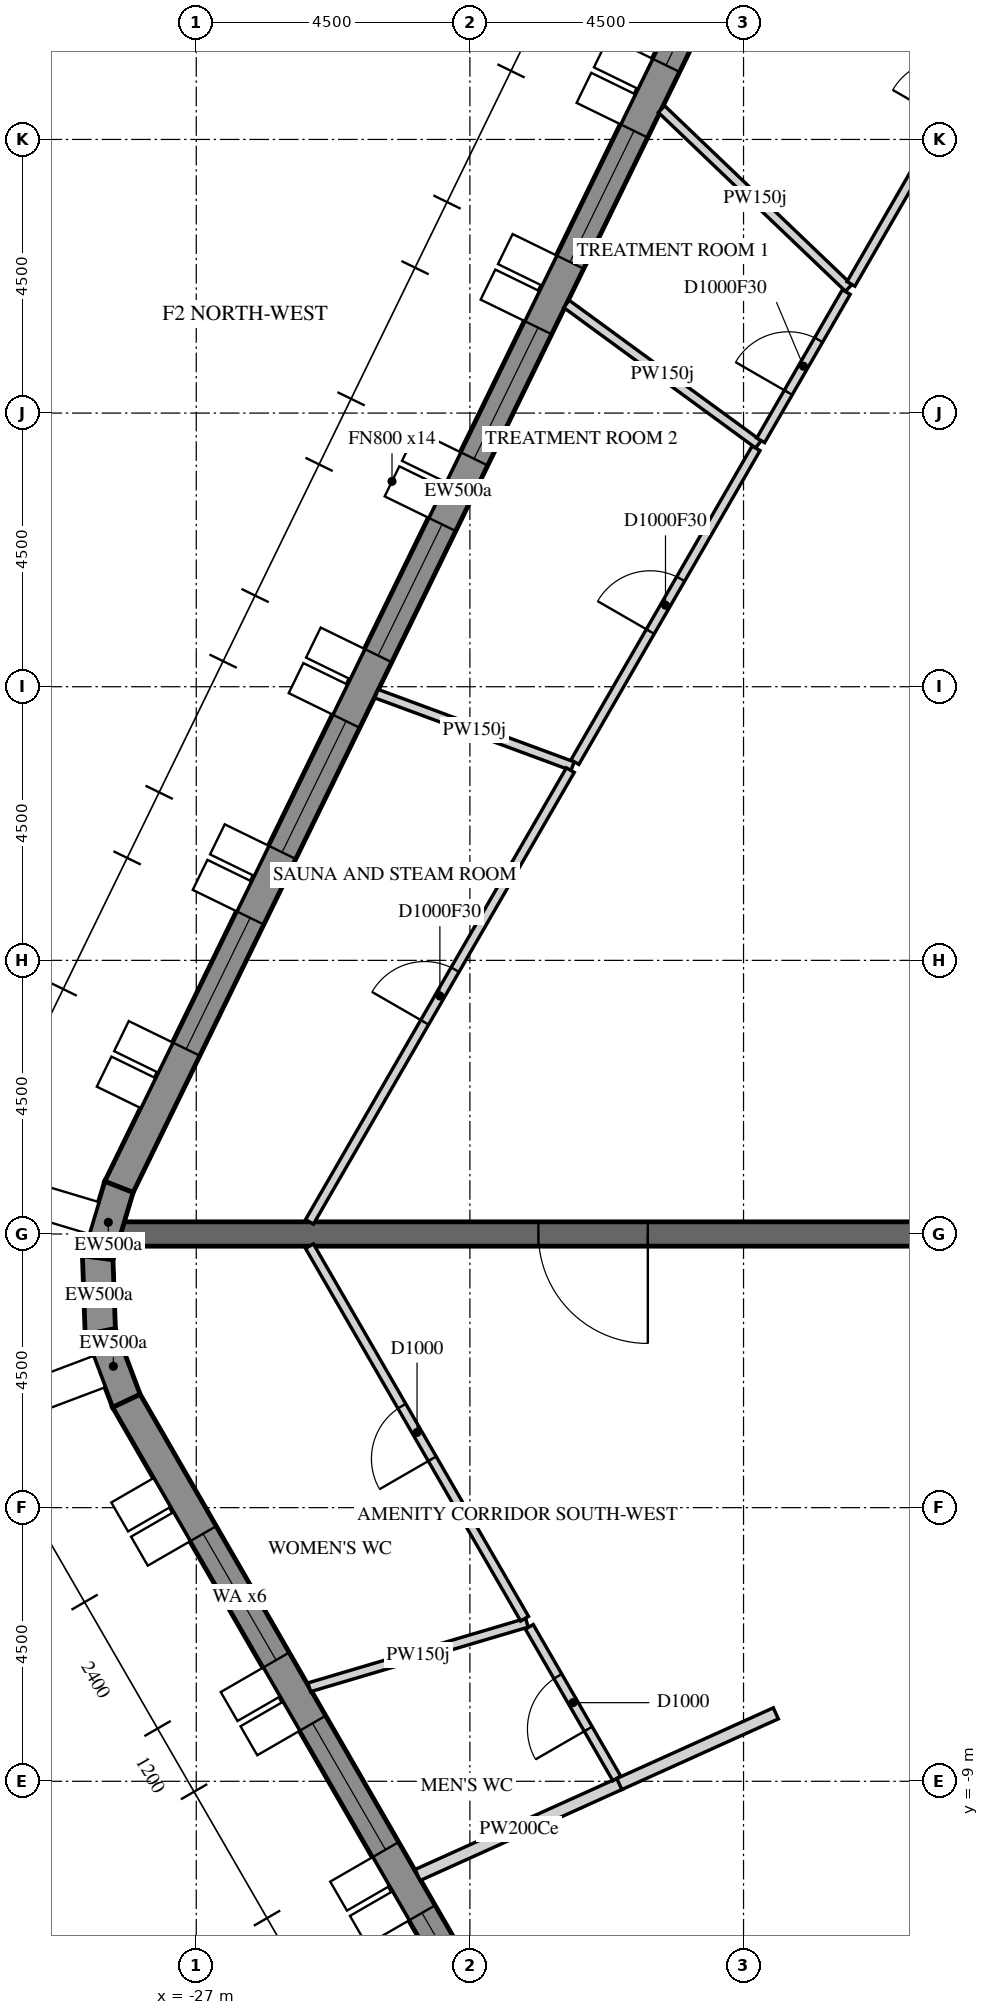
"""IFC4 building model, lengths in metres.
Left out: names, types, materials, properties, quantities, classifications, styles, units other than length and angle.
Written with IfcOpenShell. Run it as: python <this file> out.ifc"""

import sys

from ifc_helpers import new_model, si_unit, direction, frame, frame_2d, origin, place, context, subcontext, project, spatial, polyline, rectangle, outline, extrude, element, fill, save


model = new_model("IFC4")
c1 = context("Model", 3, precision=1e-05, world=origin(), true_north=direction((0.0, 1.0)))
c2 = subcontext(c1, "Body", "Model", "MODEL_VIEW")
j1 = project(units=[si_unit("LENGTHUNIT", "METRE"), si_unit("PLANEANGLEUNIT", "RADIAN")], contexts=[c1])
p1 = place(None, origin())
s1 = spatial("IfcSite", under=j1, at=p1, CompositionType="ELEMENT")
p2 = place(p1, origin())
s2 = spatial("IfcBuilding", under=s1, at=p2, CompositionType="ELEMENT")
p3 = place(p2, frame((0.0, 0.0, 338.1)))
s3 = spatial("IfcBuildingStorey", under=s2, at=p3, CompositionType="ELEMENT", Elevation=338.1)
p4 = place(p3, frame((-17.118, 23.644, -0.3), z_axis=(0.0, 0.0, 1.0), x_axis=(-0.438368241894, -0.898795463106, 0.0)))
e1 = element("IfcWall", 1, at=p4, inside=s3, PredefinedType="SOLIDWALL", context=c2, shape_type="SweptSolid", body=[
    extrude(outline(polyline([(-0.023, -0.25), (25.465, -0.25), (25.424, 0.25), (0.023, 0.25), (-0.023, -0.25)])), origin(), (0.0, 0.0, 1.0), 5.4),
])
p5 = place(p4, frame((2.522, 0.0, 1.2)))
e2 = element("IfcOpeningElement", 2, at=p5, cuts=e1, PredefinedType="OPENING", context=c2, shape_type="SweptSolid", body=[
    extrude(rectangle(XDim=2.4, YDim=3.6, at=frame_2d((1.2, 1.8))), frame((0.0, 0.26, 0.0), z_axis=(0.0, -1.0, 0.0), x_axis=(1.0, 0.0, 0.0)), (0.0, 0.0, 1.0), 0.52),
])
p6 = place(p4, frame((6.122, 0.0, 1.2)))
e3 = element("IfcOpeningElement", 3, at=p6, cuts=e1, PredefinedType="OPENING", context=c2, shape_type="SweptSolid", body=[
    extrude(rectangle(XDim=2.4, YDim=3.6, at=frame_2d((1.2, 1.8))), frame((0.0, 0.26, 0.0), z_axis=(0.0, -1.0, 0.0), x_axis=(1.0, 0.0, 0.0)), (0.0, 0.0, 1.0), 0.52),
])
p7 = place(p4, frame((9.722, 0.0, 1.2)))
e4 = element("IfcOpeningElement", 4, at=p7, cuts=e1, PredefinedType="OPENING", context=c2, shape_type="SweptSolid", body=[
    extrude(rectangle(XDim=2.4, YDim=3.6, at=frame_2d((1.2, 1.8))), frame((0.0, 0.26, 0.0), z_axis=(0.0, -1.0, 0.0), x_axis=(1.0, 0.0, 0.0)), (0.0, 0.0, 1.0), 0.52),
])
p8 = place(p4, frame((13.323, 0.0, 1.2)))
e5 = element("IfcOpeningElement", 5, at=p8, cuts=e1, PredefinedType="OPENING", context=c2, shape_type="SweptSolid", body=[
    extrude(rectangle(XDim=2.4, YDim=3.6, at=frame_2d((1.2, 1.8))), frame((0.0, 0.26, 0.0), z_axis=(0.0, -1.0, 0.0), x_axis=(1.0, 0.0, 0.0)), (0.0, 0.0, 1.0), 0.52),
])
p9 = place(p4, frame((16.922, 0.0, 1.2)))
e6 = element("IfcOpeningElement", 6, at=p9, cuts=e1, PredefinedType="OPENING", context=c2, shape_type="SweptSolid", body=[
    extrude(rectangle(XDim=2.4, YDim=3.6, at=frame_2d((1.2, 1.8))), frame((0.0, 0.26, 0.0), z_axis=(0.0, -1.0, 0.0), x_axis=(1.0, 0.0, 0.0)), (0.0, 0.0, 1.0), 0.52),
])
p10 = place(p4, frame((20.522, 0.0, 1.2)))
e7 = element("IfcOpeningElement", 7, at=p10, cuts=e1, PredefinedType="OPENING", context=c2, shape_type="SweptSolid", body=[
    extrude(rectangle(XDim=2.4, YDim=3.6, at=frame_2d((1.2, 1.8))), frame((0.0, 0.26, 0.0), z_axis=(0.0, -1.0, 0.0), x_axis=(1.0, 0.0, 0.0)), (0.0, 0.0, 1.0), 0.52),
])
p11 = place(p3, frame((-28.272, 0.774, -0.3), z_axis=(0.0, 0.0, 1.0), x_axis=(-0.286813843218, -0.957986335674, 0.0)))
e8 = element("IfcWall", 8, at=p11, inside=s3, PredefinedType="SOLIDWALL", context=c2, shape_type="SweptSolid", body=[
    extrude(outline(polyline([(-0.021, -0.25), (1.257, -0.25), (1.175, 0.25), (0.021, 0.25), (-0.021, -0.25)])), origin(), (0.0, 0.0, 1.0), 5.4),
])
p12 = place(p3, frame((-28.621, -0.391, -0.3), z_axis=(0.0, 0.0, 1.0), x_axis=(0.034925456137, -0.999389920158, 0.0)))
e9 = element("IfcWall", 9, at=p12, inside=s3, PredefinedType="SOLIDWALL", context=c2, shape_type="SweptSolid", body=[
    extrude(outline(polyline([(-0.041, -0.25), (1.257, -0.25), (1.175, 0.25), (0.041, 0.25), (-0.041, -0.25)])), origin(), (0.0, 0.0, 1.0), 5.4),
])
p13 = place(p3, frame((-28.578, -1.606, -0.3), z_axis=(0.0, 0.0, 1.0), x_axis=(0.352838463023, -0.935684251771, 0.0)))
e10 = element("IfcWall", 10, at=p13, inside=s3, PredefinedType="SOLIDWALL", context=c2, shape_type="SweptSolid", body=[
    extrude(outline(polyline([(-0.041, -0.25), (1.237, -0.25), (1.196, 0.25), (0.041, 0.25), (-0.041, -0.25)])), origin(), (0.0, 0.0, 1.0), 5.4),
])
p14 = place(p3, frame((-28.149, -2.745, -0.3), z_axis=(0.0, 0.0, 1.0), x_axis=(0.500003737743, -0.866023245787, 0.0)))
e11 = element("IfcWall", 11, at=p14, inside=s3, PredefinedType="SOLIDWALL", context=c2, shape_type="SweptSolid", body=[
    extrude(outline(polyline([(-0.021, -0.25), (25.468, -0.25), (25.421, 0.25), (0.021, 0.25), (-0.021, -0.25)])), origin(), (0.0, 0.0, 1.0), 5.4),
])
p15 = place(p14, frame((2.522, 0.0, 1.2)))
e12 = element("IfcOpeningElement", 12, at=p15, cuts=e11, PredefinedType="OPENING", context=c2, shape_type="SweptSolid", body=[
    extrude(rectangle(XDim=2.4, YDim=3.6, at=frame_2d((1.2, 1.8))), frame((0.0, 0.26, 0.0), z_axis=(0.0, -1.0, 0.0), x_axis=(1.0, 0.0, 0.0)), (0.0, 0.0, 1.0), 0.52),
])
p16 = place(p14, frame((6.122, 0.0, 1.2)))
e13 = element("IfcOpeningElement", 13, at=p16, cuts=e11, PredefinedType="OPENING", context=c2, shape_type="SweptSolid", body=[
    extrude(rectangle(XDim=2.4, YDim=3.6, at=frame_2d((1.2, 1.8))), frame((0.0, 0.26, 0.0), z_axis=(0.0, -1.0, 0.0), x_axis=(1.0, 0.0, 0.0)), (0.0, 0.0, 1.0), 0.52),
])
p17 = place(p14, frame((9.722, 0.0, 1.2)))
e14 = element("IfcOpeningElement", 14, at=p17, cuts=e11, PredefinedType="OPENING", context=c2, shape_type="SweptSolid", body=[
    extrude(rectangle(XDim=2.4, YDim=3.6, at=frame_2d((1.2, 1.8))), frame((0.0, 0.26, 0.0), z_axis=(0.0, -1.0, 0.0), x_axis=(1.0, 0.0, 0.0)), (0.0, 0.0, 1.0), 0.52),
])
p18 = place(p14, frame((13.323, 0.0, 1.2)))
e15 = element("IfcOpeningElement", 15, at=p18, cuts=e11, PredefinedType="OPENING", context=c2, shape_type="SweptSolid", body=[
    extrude(rectangle(XDim=2.4, YDim=3.6, at=frame_2d((1.2, 1.8))), frame((0.0, 0.26, 0.0), z_axis=(0.0, -1.0, 0.0), x_axis=(1.0, 0.0, 0.0)), (0.0, 0.0, 1.0), 0.52),
])
p19 = place(p14, frame((16.922, 0.0, 1.2)))
e16 = element("IfcOpeningElement", 16, at=p19, cuts=e11, PredefinedType="OPENING", context=c2, shape_type="SweptSolid", body=[
    extrude(rectangle(XDim=2.4, YDim=3.6, at=frame_2d((1.2, 1.8))), frame((0.0, 0.26, 0.0), z_axis=(0.0, -1.0, 0.0), x_axis=(1.0, 0.0, 0.0)), (0.0, 0.0, 1.0), 0.52),
])
p20 = place(p14, frame((20.522, 0.0, 1.2)))
e17 = element("IfcOpeningElement", 17, at=p20, cuts=e11, PredefinedType="OPENING", context=c2, shape_type="SweptSolid", body=[
    extrude(rectangle(XDim=2.4, YDim=3.6, at=frame_2d((1.2, 1.8))), frame((0.0, 0.26, 0.0), z_axis=(0.0, -1.0, 0.0), x_axis=(1.0, 0.0, 0.0)), (0.0, 0.0, 1.0), 0.52),
])
p21 = place(p3, frame((-12.702, 0.0, -0.3), z_axis=(0.0, 0.0, 1.0), x_axis=(-1.0, 0.0, 0.0)))
e18 = element("IfcWall", 18, at=p21, inside=s3, PredefinedType="SHEAR", context=c2, shape_type="SweptSolid", body=[
    extrude(rectangle(XDim=15.544, YDim=0.4, at=frame_2d((7.772, 0.0))), origin(), (0.0, 0.0, 1.0), 5.4),
])
p22 = place(p21, frame((6.872, 0.0, 0.3)))
e19 = element("IfcOpeningElement", 19, at=p22, cuts=e18, PredefinedType="OPENING", context=c2, shape_type="SweptSolid", body=[
    extrude(rectangle(XDim=1.8, YDim=2.4, at=frame_2d((0.9, 1.2))), frame((0.0, 0.21, 0.0), z_axis=(0.0, -1.0, 0.0), x_axis=(1.0, 0.0, 0.0)), (0.0, 0.0, 1.0), 0.42),
])
p23 = place(p3, frame((-25.141, -7.454, 0.0), z_axis=(0.0, 0.0, 1.0), x_axis=(0.958757197132, 0.28422638327, 0.0)))
e20 = element("IfcWall", 20, at=p23, inside=s3, PredefinedType="PARTITIONING", context=c2, shape_type="SweptSolid", body=[
    extrude(rectangle(XDim=3.733, YDim=0.15, at=frame_2d((1.867, 0.0))), origin(), (0.0, 0.0, 1.0), 4.346),
])
p24 = place(p3, frame((-21.601, -6.326, 0.0), z_axis=(0.0, 0.0, 1.0), x_axis=(-0.500040111433, 0.866002244199, 0.0)))
e21 = element("IfcWall", 21, at=p24, inside=s3, PredefinedType="PARTITIONING", context=c2, shape_type="SweptSolid", body=[
    extrude(rectangle(XDim=7.074, YDim=0.15, at=frame_2d((3.537, 0.0))), origin(), (0.0, 0.0, 1.0), 5.1),
])
p25 = place(p24, frame((3.037, 0.0, 0.0)))
e22 = element("IfcOpeningElement", 22, at=p25, cuts=e21, PredefinedType="OPENING", context=c2, shape_type="SweptSolid", body=[
    extrude(rectangle(XDim=1.0, YDim=2.1, at=frame_2d((0.5, 1.05))), frame((0.0, 0.085, 0.0), z_axis=(0.0, -1.0, 0.0), x_axis=(1.0, 0.0, 0.0)), (0.0, 0.0, 1.0), 0.17),
])
p26 = place(p3, frame((-24.037, 8.886, 0.0), z_axis=(0.0, 0.0, 1.0), x_axis=(0.938027612167, -0.346560526911, 0.0)))
e23 = element("IfcWall", 23, at=p26, inside=s3, PredefinedType="PARTITIONING", context=c2, shape_type="SweptSolid", body=[
    extrude(rectangle(XDim=3.439, YDim=0.15, at=frame_2d((1.72, 0.0))), origin(), (0.0, 0.0, 1.0), 4.346),
])
p27 = place(p3, frame((-23.359, -10.541, 0.0), z_axis=(0.0, 0.0, 1.0), x_axis=(0.91155143735, 0.41118606137, 0.0)))
e24 = element("IfcWall", 24, at=p27, inside=s3, PredefinedType="PARTITIONING", context=c2, shape_type="SweptSolid", body=[
    extrude(rectangle(XDim=3.657, YDim=0.2, at=frame_2d((1.829, 0.0))), origin(), (0.0, 0.0, 1.0), 4.346),
])
p28 = place(p3, frame((-20.084, -8.954, 0.0), z_axis=(0.0, 0.0, 1.0), x_axis=(-0.499795848753, 0.866143238483, 0.0)))
e25 = element("IfcWall", 25, at=p28, inside=s3, PredefinedType="PARTITIONING", context=c2, shape_type="SweptSolid", body=[
    extrude(rectangle(XDim=2.88, YDim=0.15, at=frame_2d((1.44, 0.0))), origin(), (0.0, 0.0, 1.0), 5.1),
])
p29 = place(p28, frame((0.94, 0.0, 0.0)))
e26 = element("IfcOpeningElement", 26, at=p29, cuts=e25, PredefinedType="OPENING", context=c2, shape_type="SweptSolid", body=[
    extrude(rectangle(XDim=1.0, YDim=2.1, at=frame_2d((0.5, 1.05))), frame((0.0, 0.085, 0.0), z_axis=(0.0, -1.0, 0.0), x_axis=(1.0, 0.0, 0.0)), (0.0, 0.0, 1.0), 0.17),
])
p30 = place(p3, frame((-20.912, 15.295, 0.0), z_axis=(0.0, 0.0, 1.0), x_axis=(0.807083298113, -0.590437591882, 0.0)))
e27 = element("IfcWall", 27, at=p30, inside=s3, PredefinedType="PARTITIONING", context=c2, shape_type="SweptSolid", body=[
    extrude(rectangle(XDim=3.91, YDim=0.15, at=frame_2d((1.955, 0.0))), origin(), (0.0, 0.0, 1.0), 4.346),
])
p31 = place(p3, frame((-25.138, 0.2, 0.0), z_axis=(0.0, 0.0, 1.0), x_axis=(0.500011542666, 0.866018739521, 0.0)))
e28 = element("IfcWall", 28, at=p31, inside=s3, PredefinedType="PARTITIONING", context=c2, shape_type="SweptSolid", body=[
    extrude(rectangle(XDim=8.577, YDim=0.15, at=frame_2d((4.289, 0.0))), origin(), (0.0, 0.0, 1.0), 5.1),
])
p32 = place(p31, frame((3.789, 0.0, 0.0)))
e29 = element("IfcOpeningElement", 29, at=p32, cuts=e28, PredefinedType="OPENING", context=c2, shape_type="SweptSolid", body=[
    extrude(rectangle(XDim=1.0, YDim=2.1, at=frame_2d((0.5, 1.05))), frame((0.0, 0.085, 0.0), z_axis=(0.0, -1.0, 0.0), x_axis=(1.0, 0.0, 0.0)), (0.0, 0.0, 1.0), 0.17),
])
p33 = place(p3, frame((-20.043, -9.045, 0.0), z_axis=(0.0, 0.0, 1.0), x_axis=(0.911446947279, 0.411417625164, 0.0)))
e30 = element("IfcWall", 30, at=p33, inside=s3, PredefinedType="PARTITIONING", context=c2, shape_type="SweptSolid", body=[
    extrude(rectangle(XDim=2.824, YDim=0.2, at=frame_2d((1.412, 0.0))), origin(), (0.0, 0.0, 1.0), 4.346),
])
p34 = place(p3, frame((-19.349, 18.499, 0.0), z_axis=(0.0, 0.0, 1.0), x_axis=(0.722785064333, -0.691072898309, 0.0)))
e31 = element("IfcWall", 31, at=p34, inside=s3, PredefinedType="PARTITIONING", context=c2, shape_type="SweptSolid", body=[
    extrude(rectangle(XDim=4.257, YDim=0.15, at=frame_2d((2.129, 0.0))), origin(), (0.0, 0.0, 1.0), 4.346),
])
p35 = place(p3, frame((-20.773, 7.76, 0.0), z_axis=(0.0, 0.0, 1.0), x_axis=(0.49996834992, 0.866043676195, 0.0)))
e32 = element("IfcWall", 32, at=p35, inside=s3, PredefinedType="PARTITIONING", context=c2, shape_type="SweptSolid", body=[
    extrude(rectangle(XDim=5.959, YDim=0.15, at=frame_2d((2.979, 0.0))), origin(), (0.0, 0.0, 1.0), 5.1),
])
p36 = place(p35, frame((2.479, 0.0, 0.0)))
e33 = element("IfcOpeningElement", 33, at=p36, cuts=e32, PredefinedType="OPENING", context=c2, shape_type="SweptSolid", body=[
    extrude(rectangle(XDim=1.0, YDim=2.1, at=frame_2d((0.5, 1.05))), frame((0.0, 0.085, 0.0), z_axis=(0.0, -1.0, 0.0), x_axis=(1.0, 0.0, 0.0)), (0.0, 0.0, 1.0), 0.17),
])
p37 = place(p3, frame((-17.718, 13.051, 0.0), z_axis=(0.0, 0.0, 1.0), x_axis=(0.4998875608, 0.866090310855, 0.0)))
e34 = element("IfcWall", 34, at=p37, inside=s3, PredefinedType="PARTITIONING", context=c2, shape_type="SweptSolid", body=[
    extrude(rectangle(XDim=2.816, YDim=0.15, at=frame_2d((1.408, 0.0))), origin(), (0.0, 0.0, 1.0), 5.1),
])
p38 = place(p37, frame((0.908, 0.0, 0.0)))
e35 = element("IfcOpeningElement", 35, at=p38, cuts=e34, PredefinedType="OPENING", context=c2, shape_type="SweptSolid", body=[
    extrude(rectangle(XDim=1.0, YDim=2.1, at=frame_2d((0.5, 1.05))), frame((0.0, 0.085, 0.0), z_axis=(0.0, -1.0, 0.0), x_axis=(1.0, 0.0, 0.0)), (0.0, 0.0, 1.0), 0.17),
])
p39 = place(p3, frame((-16.233, 15.624, 0.0), z_axis=(0.0, 0.0, 1.0), x_axis=(0.500012524703, 0.866018172523, 0.0)))
e36 = element("IfcWall", 36, at=p39, inside=s3, PredefinedType="PARTITIONING", context=c2, shape_type="SweptSolid", body=[
    extrude(rectangle(XDim=7.213, YDim=0.15, at=frame_2d((3.606, 0.0))), origin(), (0.0, 0.0, 1.0), 5.1),
])
p40 = place(p39, frame((3.106, 0.0, 0.0)))
e37 = element("IfcOpeningElement", 37, at=p40, cuts=e36, PredefinedType="OPENING", context=c2, shape_type="SweptSolid", body=[
    extrude(rectangle(XDim=1.0, YDim=2.1, at=frame_2d((0.5, 1.05))), frame((0.0, 0.085, 0.0), z_axis=(0.0, -1.0, 0.0), x_axis=(1.0, 0.0, 0.0)), (0.0, 0.0, 1.0), 0.17),
])
p41 = place(p5, frame((0.0, 0.18, 0.0)))
e38 = element("IfcWindow", 38, at=p41, inside=s3, PartitioningType="DOUBLE_PANEL_VERTICAL", PredefinedType="WINDOW", context=c2, shape_type="SweptSolid", body=[
    extrude(rectangle(XDim=2.4, YDim=3.6, at=frame_2d((1.2, 1.8))), frame((0.0, 0.03, 0.0), z_axis=(0.0, -1.0, 0.0), x_axis=(1.0, 0.0, 0.0)), (0.0, 0.0, 1.0), 0.06),
])
fill(e2, e38)
p42 = place(p6, frame((0.0, 0.18, 0.0)))
e39 = element("IfcWindow", 39, at=p42, inside=s3, PartitioningType="DOUBLE_PANEL_VERTICAL", PredefinedType="WINDOW", context=c2, shape_type="SweptSolid", body=[
    extrude(rectangle(XDim=2.4, YDim=3.6, at=frame_2d((1.2, 1.8))), frame((0.0, 0.03, 0.0), z_axis=(0.0, -1.0, 0.0), x_axis=(1.0, 0.0, 0.0)), (0.0, 0.0, 1.0), 0.06),
])
fill(e3, e39)
p43 = place(p7, frame((0.0, 0.18, 0.0)))
e40 = element("IfcWindow", 40, at=p43, inside=s3, PartitioningType="DOUBLE_PANEL_VERTICAL", PredefinedType="WINDOW", context=c2, shape_type="SweptSolid", body=[
    extrude(rectangle(XDim=2.4, YDim=3.6, at=frame_2d((1.2, 1.8))), frame((0.0, 0.03, 0.0), z_axis=(0.0, -1.0, 0.0), x_axis=(1.0, 0.0, 0.0)), (0.0, 0.0, 1.0), 0.06),
])
fill(e4, e40)
p44 = place(p8, frame((0.0, 0.18, 0.0)))
e41 = element("IfcWindow", 41, at=p44, inside=s3, PartitioningType="DOUBLE_PANEL_VERTICAL", PredefinedType="WINDOW", context=c2, shape_type="SweptSolid", body=[
    extrude(rectangle(XDim=2.4, YDim=3.6, at=frame_2d((1.2, 1.8))), frame((0.0, 0.03, 0.0), z_axis=(0.0, -1.0, 0.0), x_axis=(1.0, 0.0, 0.0)), (0.0, 0.0, 1.0), 0.06),
])
fill(e5, e41)
p45 = place(p9, frame((0.0, 0.18, 0.0)))
e42 = element("IfcWindow", 42, at=p45, inside=s3, PartitioningType="DOUBLE_PANEL_VERTICAL", PredefinedType="WINDOW", context=c2, shape_type="SweptSolid", body=[
    extrude(rectangle(XDim=2.4, YDim=3.6, at=frame_2d((1.2, 1.8))), frame((0.0, 0.03, 0.0), z_axis=(0.0, -1.0, 0.0), x_axis=(1.0, 0.0, 0.0)), (0.0, 0.0, 1.0), 0.06),
])
fill(e6, e42)
p46 = place(p10, frame((0.0, 0.18, 0.0)))
e43 = element("IfcWindow", 43, at=p46, inside=s3, PartitioningType="DOUBLE_PANEL_VERTICAL", PredefinedType="WINDOW", context=c2, shape_type="SweptSolid", body=[
    extrude(rectangle(XDim=2.4, YDim=3.6, at=frame_2d((1.2, 1.8))), frame((0.0, 0.03, 0.0), z_axis=(0.0, -1.0, 0.0), x_axis=(1.0, 0.0, 0.0)), (0.0, 0.0, 1.0), 0.06),
])
fill(e7, e43)
p47 = place(p15, frame((0.0, 0.18, 0.0)))
e44 = element("IfcWindow", 44, at=p47, inside=s3, PartitioningType="DOUBLE_PANEL_VERTICAL", PredefinedType="WINDOW", context=c2, shape_type="SweptSolid", body=[
    extrude(rectangle(XDim=2.4, YDim=3.6, at=frame_2d((1.2, 1.8))), frame((0.0, 0.03, 0.0), z_axis=(0.0, -1.0, 0.0), x_axis=(1.0, 0.0, 0.0)), (0.0, 0.0, 1.0), 0.06),
])
fill(e12, e44)
p48 = place(p16, frame((0.0, 0.18, 0.0)))
e45 = element("IfcWindow", 45, at=p48, inside=s3, PartitioningType="DOUBLE_PANEL_VERTICAL", PredefinedType="WINDOW", context=c2, shape_type="SweptSolid", body=[
    extrude(rectangle(XDim=2.4, YDim=3.6, at=frame_2d((1.2, 1.8))), frame((0.0, 0.03, 0.0), z_axis=(0.0, -1.0, 0.0), x_axis=(1.0, 0.0, 0.0)), (0.0, 0.0, 1.0), 0.06),
])
fill(e13, e45)
p49 = place(p17, frame((0.0, 0.18, 0.0)))
e46 = element("IfcWindow", 46, at=p49, inside=s3, PartitioningType="DOUBLE_PANEL_VERTICAL", PredefinedType="WINDOW", context=c2, shape_type="SweptSolid", body=[
    extrude(rectangle(XDim=2.4, YDim=3.6, at=frame_2d((1.2, 1.8))), frame((0.0, 0.03, 0.0), z_axis=(0.0, -1.0, 0.0), x_axis=(1.0, 0.0, 0.0)), (0.0, 0.0, 1.0), 0.06),
])
fill(e14, e46)
p50 = place(p22, origin())
e47 = element("IfcDoor", 47, at=p50, inside=s3, OperationType="DOUBLE_DOOR_SINGLE_SWING", PredefinedType="DOOR", context=c2, shape_type="SweptSolid", body=[
    extrude(rectangle(XDim=1.8, YDim=2.4, at=frame_2d((0.9, 1.2))), frame((0.0, 0.025, 0.0), z_axis=(0.0, -1.0, 0.0), x_axis=(1.0, 0.0, 0.0)), (0.0, 0.0, 1.0), 0.05),
])
fill(e19, e47)
p51 = place(p25, origin())
e48 = element("IfcDoor", 48, at=p51, inside=s3, OperationType="SINGLE_SWING_RIGHT", PredefinedType="DOOR", context=c2, shape_type="SweptSolid", body=[
    extrude(rectangle(XDim=1.0, YDim=2.1, at=frame_2d((0.5, 1.05))), frame((0.0, 0.025, 0.0), z_axis=(0.0, -1.0, 0.0), x_axis=(1.0, 0.0, 0.0)), (0.0, 0.0, 1.0), 0.05),
])
fill(e22, e48)
p52 = place(p29, origin())
e49 = element("IfcDoor", 49, at=p52, inside=s3, OperationType="SINGLE_SWING_LEFT", PredefinedType="DOOR", context=c2, shape_type="SweptSolid", body=[
    extrude(rectangle(XDim=1.0, YDim=2.1, at=frame_2d((0.5, 1.05))), frame((0.0, 0.025, 0.0), z_axis=(0.0, -1.0, 0.0), x_axis=(1.0, 0.0, 0.0)), (0.0, 0.0, 1.0), 0.05),
])
fill(e26, e49)
p53 = place(p32, origin())
e50 = element("IfcDoor", 50, at=p53, inside=s3, OperationType="SINGLE_SWING_RIGHT", PredefinedType="DOOR", context=c2, shape_type="SweptSolid", body=[
    extrude(rectangle(XDim=1.0, YDim=2.1, at=frame_2d((0.5, 1.05))), frame((0.0, 0.025, 0.0), z_axis=(0.0, -1.0, 0.0), x_axis=(1.0, 0.0, 0.0)), (0.0, 0.0, 1.0), 0.05),
])
fill(e29, e50)
p54 = place(p36, origin())
e51 = element("IfcDoor", 51, at=p54, inside=s3, OperationType="SINGLE_SWING_LEFT", PredefinedType="DOOR", context=c2, shape_type="SweptSolid", body=[
    extrude(rectangle(XDim=1.0, YDim=2.1, at=frame_2d((0.5, 1.05))), frame((0.0, 0.025, 0.0), z_axis=(0.0, -1.0, 0.0), x_axis=(1.0, 0.0, 0.0)), (0.0, 0.0, 1.0), 0.05),
])
fill(e33, e51)
p55 = place(p38, origin())
e52 = element("IfcDoor", 52, at=p55, inside=s3, OperationType="SINGLE_SWING_RIGHT", PredefinedType="DOOR", context=c2, shape_type="SweptSolid", body=[
    extrude(rectangle(XDim=1.0, YDim=2.1, at=frame_2d((0.5, 1.05))), frame((0.0, 0.025, 0.0), z_axis=(0.0, -1.0, 0.0), x_axis=(1.0, 0.0, 0.0)), (0.0, 0.0, 1.0), 0.05),
])
fill(e35, e52)
save(model, sys.argv[1])
